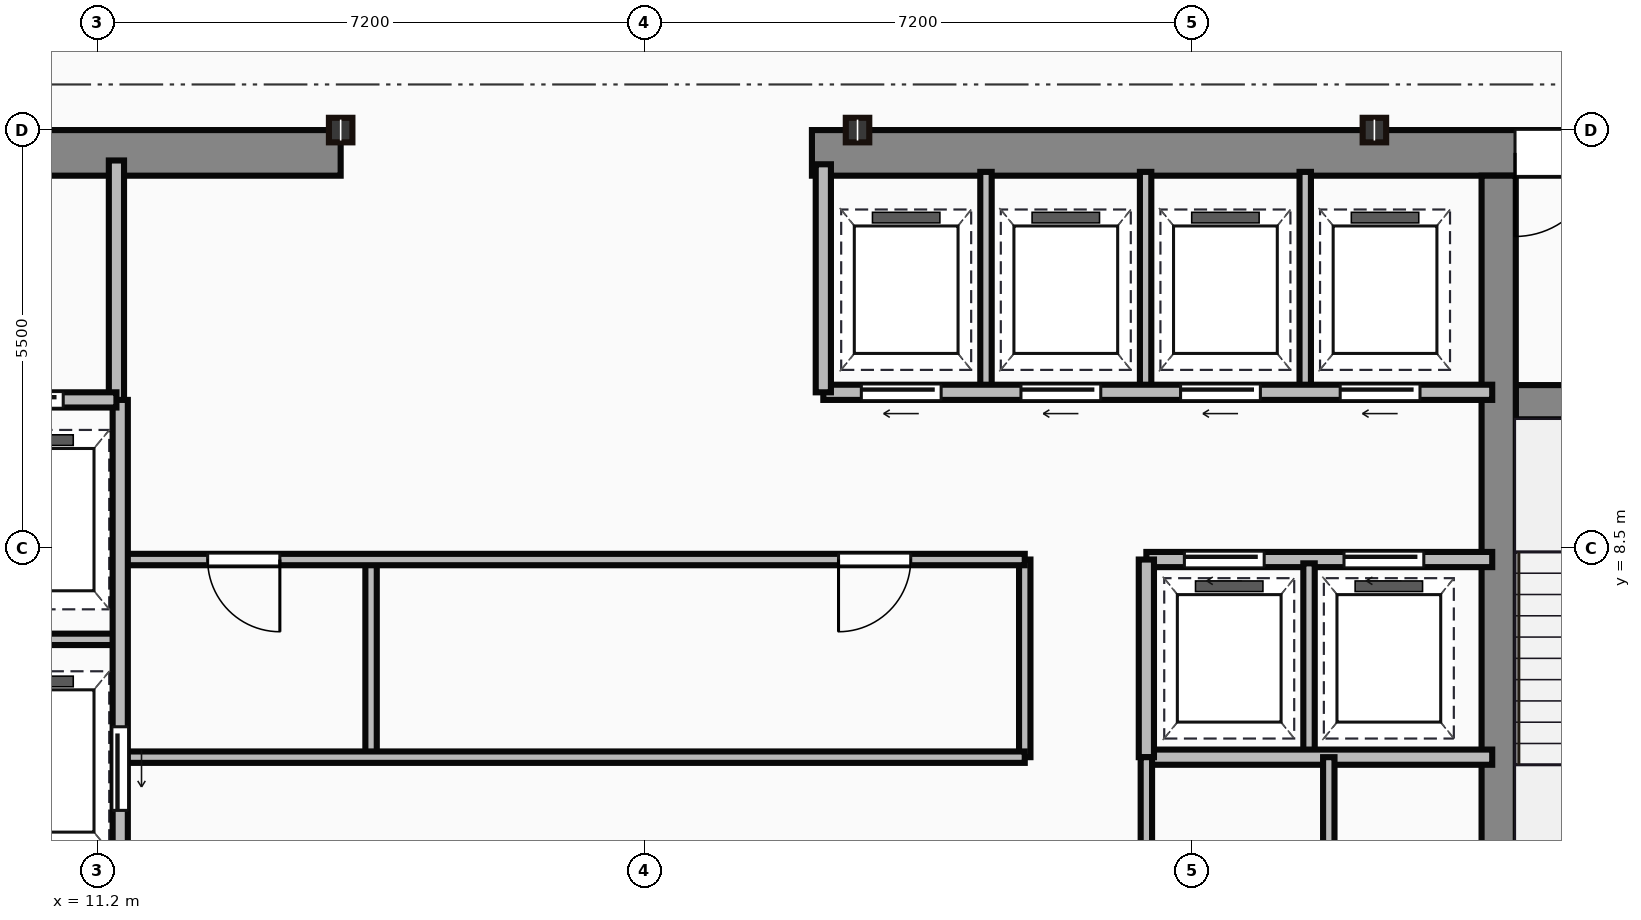
"""IFC4 building model, lengths in metres.
Left out: names, types, materials, properties, quantities, classifications, styles, units other than length and angle.
Written with IfcOpenShell. Run it as: python <this file> out.ifc"""

import sys

from ifc_helpers import new_model, si_unit, direction, frame, frame_2d, origin, origin_2d, place, context, subcontext, project, spatial, rectangle, i_section, extrude, source, transform, mapped, element, fill, save


model = new_model("IFC4")
c1 = context("Model", 3, precision=1e-05, world=origin(), true_north=direction((0.0, 1.0)))
c2 = subcontext(c1, "Body", "Model", "MODEL_VIEW")
j1 = project(units=[si_unit("LENGTHUNIT", "METRE"), si_unit("PLANEANGLEUNIT", "RADIAN")], contexts=[c1])
p1 = place(None, origin())
s1 = spatial("IfcSite", under=j1, at=p1, CompositionType="ELEMENT")
p2 = place(p1, origin())
s2 = spatial("IfcBuilding", under=s1, at=p2, CompositionType="ELEMENT")
p3 = place(p2, frame((0.0, 0.0, 269.75)))
s3 = spatial("IfcBuildingStorey", under=s2, at=p3, CompositionType="ELEMENT", Elevation=269.75)
m1 = source(origin(), c2, "Body", "SweptSolid", [
    extrude(rectangle(XDim=9.1, YDim=0.6, at=frame_2d((4.55, 0.0))), origin(), (0.0, 0.0, 1.0), 3.65),
])
p4 = place(p3, frame((5.3, 13.7, 0.0), z_axis=(0.0, 0.0, 1.0), x_axis=(1.0, 0.0, 0.0)))
e1 = element("IfcWall", 1, at=p4, inside=s3, PredefinedType="SHEAR", context=c2, shape_type="MappedRepresentation", body=[
    mapped(m1, transform((0.0, 0.0, 0.0))),
])
p5 = place(p4, frame((4.1, 0.0, 0.0)))
e2 = element("IfcOpeningElement", 2, at=p5, cuts=e1, PredefinedType="OPENING", context=c2, shape_type="SweptSolid", body=[
    extrude(rectangle(XDim=1.1, YDim=2.15, at=frame_2d((0.55, 1.075))), frame((0.0, 0.31, 0.0), z_axis=(0.0, -1.0, 0.0), x_axis=(1.0, 0.0, 0.0)), (0.0, 0.0, 1.0), 0.62),
])
m2 = source(origin(), c2, "Body", "SweptSolid", [
    extrude(rectangle(XDim=12.6, YDim=0.6, at=frame_2d((6.3, 0.0))), origin(), (0.0, 0.0, 1.0), 3.65),
])
p6 = place(p3, frame((20.6, 13.7, 0.0), z_axis=(0.0, 0.0, 1.0), x_axis=(1.0, 0.0, 0.0)))
e3 = element("IfcWall", 3, at=p6, inside=s3, PredefinedType="SHEAR", context=c2, shape_type="MappedRepresentation", body=[
    mapped(m2, transform((0.0, 0.0, 0.0))),
])
p7 = place(p6, frame((9.25, 0.0, 0.0)))
e4 = element("IfcOpeningElement", 4, at=p7, cuts=e3, PredefinedType="OPENING", context=c2, shape_type="SweptSolid", body=[
    extrude(rectangle(XDim=1.1, YDim=2.15, at=frame_2d((0.55, 1.075))), frame((0.0, 0.31, 0.0), z_axis=(0.0, -1.0, 0.0), x_axis=(1.0, 0.0, 0.0)), (0.0, 0.0, 1.0), 0.62),
])
m3 = source(origin(), c2, "Body", "SweptSolid", [
    extrude(rectangle(XDim=12.5, YDim=0.45, at=frame_2d((6.25, 0.0))), origin(), (0.0, 0.0, 1.0), 3.65),
])
p8 = place(p3, frame((29.635, 0.9, 0.0), z_axis=(0.0, 0.0, 1.0), x_axis=(0.0, 1.0, 0.0)))
e5 = element("IfcWall", 5, at=p8, inside=s3, PredefinedType="SHEAR", context=c2, shape_type="MappedRepresentation", body=[
    mapped(m3, transform((0.0, 0.0, 0.0))),
])
m4 = source(origin(), c2, "Body", "SweptSolid", [
    extrude(rectangle(XDim=3.39, YDim=0.45, at=frame_2d((1.695, 0.0))), origin(), (0.0, 0.0, 1.0), 3.65),
])
p9 = place(p3, frame((29.86, 10.42, 0.0), z_axis=(0.0, 0.0, 1.0), x_axis=(1.0, 0.0, 0.0)))
e6 = element("IfcWall", 6, at=p9, inside=s3, PredefinedType="SHEAR", context=c2, shape_type="MappedRepresentation", body=[
    mapped(m4, transform((0.0, 0.0, 0.0))),
])
p10 = place(p9, frame((1.1, 0.0, 0.0)))
e7 = element("IfcOpeningElement", 7, at=p10, cuts=e6, PredefinedType="OPENING", context=c2, shape_type="SweptSolid", body=[
    extrude(rectangle(XDim=1.1, YDim=2.15, at=frame_2d((0.55, 1.075))), frame((0.0, 0.235, 0.0), z_axis=(0.0, -1.0, 0.0), x_axis=(1.0, 0.0, 0.0)), (0.0, 0.0, 1.0), 0.47),
])
m5 = source(origin(), c2, "Body", "SweptSolid", [
    extrude(i_section(OverallWidth=0.309, OverallDepth=0.323, WebThickness=0.014, FlangeThickness=0.023, at=origin_2d()), origin(), (0.0, 0.0, 1.0), 3.65),
])
for number, where, z_axis, x_axis in (
    (8, (14.4, 14.0, 0.0), (0.0, 0.0, 1.0), (1.0, 0.0, 0.0)),
    (9, (21.2, 14.0, 0.0), (0.0, 0.0, 1.0), (1.0, 0.0, 0.0)),
    (10, (28.0, 14.0, 0.0), (0.0, 0.0, 1.0), (1.0, 0.0, 0.0)),
):
    element("IfcColumn", number, at=place(p3, frame(where, z_axis=z_axis, x_axis=x_axis)), inside=s3, PredefinedType="COLUMN", context=c2, shape_type="MappedRepresentation", body=[
        mapped(m5, transform((0.0, 0.0, 0.0))),
    ])
m6 = source(origin(), c2, "Body", "SweptSolid", [
    extrude(rectangle(XDim=3.18, YDim=0.2, at=frame_2d((1.59, 0.0))), origin(), (0.0, 0.0, 1.0), 3.4),
])
p11 = place(p3, frame((11.45, 10.42, 0.0), z_axis=(0.0, 0.0, 1.0), x_axis=(0.0, 1.0, 0.0)))
e11 = element("IfcWall", 11, at=p11, inside=s3, PredefinedType="PARTITIONING", context=c2, shape_type="MappedRepresentation", body=[
    mapped(m6, transform((0.0, 0.0, 0.0))),
])
m7 = source(origin(), c2, "Body", "SweptSolid", [
    extrude(rectangle(XDim=2.35, YDim=0.2, at=frame_2d((1.175, 0.0))), origin(), (0.0, 0.0, 1.0), 3.4),
])
p12 = place(p3, frame((9.1, 10.45, 0.0), z_axis=(0.0, 0.0, 1.0), x_axis=(1.0, 0.0, 0.0)))
e12 = element("IfcWall", 12, at=p12, inside=s3, PredefinedType="PARTITIONING", context=c2, shape_type="MappedRepresentation", body=[
    mapped(m7, transform((0.0, 0.0, 0.0))),
])
p13 = place(p12, frame((0.55, 0.0, 0.0)))
e13 = element("IfcOpeningElement", 13, at=p13, cuts=e12, PredefinedType="OPENING", context=c2, shape_type="SweptSolid", body=[
    extrude(rectangle(XDim=1.1, YDim=2.15, at=frame_2d((0.55, 1.075))), frame((0.0, 0.11, 0.0), z_axis=(0.0, -1.0, 0.0), x_axis=(1.0, 0.0, 0.0)), (0.0, 0.0, 1.0), 0.22),
])
m8 = source(origin(), c2, "Body", "SweptSolid", [
    extrude(rectangle(XDim=9.6, YDim=0.2, at=frame_2d((4.8, 0.0))), origin(), (0.0, 0.0, 1.0), 3.4),
])
p14 = place(p3, frame((11.5, 0.85, 0.0), z_axis=(0.0, 0.0, 1.0), x_axis=(0.0, 1.0, 0.0)))
e14 = element("IfcWall", 14, at=p14, inside=s3, PredefinedType="PARTITIONING", context=c2, shape_type="MappedRepresentation", body=[
    mapped(m8, transform((0.0, 0.0, 0.0))),
])
p15 = place(p14, frame((4.2, 0.0, 0.0)))
e15 = element("IfcOpeningElement", 15, at=p15, cuts=e14, PredefinedType="OPENING", context=c2, shape_type="SweptSolid", body=[
    extrude(rectangle(XDim=1.1, YDim=2.15, at=frame_2d((0.55, 1.075))), frame((0.0, 0.11, 0.0), z_axis=(0.0, -1.0, 0.0), x_axis=(1.0, 0.0, 0.0)), (0.0, 0.0, 1.0), 0.22),
])
p16 = place(p14, frame((0.9, 0.0, 0.0)))
e16 = element("IfcOpeningElement", 16, at=p16, cuts=e14, PredefinedType="OPENING", context=c2, shape_type="SweptSolid", body=[
    extrude(rectangle(XDim=1.2, YDim=2.15, at=frame_2d((0.6, 1.075))), frame((0.0, 0.11, 0.0), z_axis=(0.0, -1.0, 0.0), x_axis=(1.0, 0.0, 0.0)), (0.0, 0.0, 1.0), 0.22),
])
m9 = source(origin(), c2, "Body", "SweptSolid", [
    extrude(rectangle(XDim=2.4, YDim=0.15, at=frame_2d((1.2, 0.0))), origin(), (0.0, 0.0, 1.0), 3.4),
])
p17 = place(p3, frame((9.1, 7.3, 0.0), z_axis=(0.0, 0.0, 1.0), x_axis=(1.0, 0.0, 0.0)))
e17 = element("IfcWall", 17, at=p17, inside=s3, PredefinedType="PARTITIONING", context=c2, shape_type="MappedRepresentation", body=[
    mapped(m9, transform((0.0, 0.0, 0.0))),
])
m10 = source(origin(), c2, "Body", "SweptSolid", [
    extrude(rectangle(XDim=11.85, YDim=0.15, at=frame_2d((5.925, 0.0))), origin(), (0.0, 0.0, 1.0), 3.4),
])
p18 = place(p3, frame((11.55, 5.75, 0.0), z_axis=(0.0, 0.0, 1.0), x_axis=(1.0, 0.0, 0.0)))
e18 = element("IfcWall", 18, at=p18, inside=s3, PredefinedType="PARTITIONING", context=c2, shape_type="MappedRepresentation", body=[
    mapped(m10, transform((0.0, 0.0, 0.0))),
])
p19 = place(p3, frame((11.55, 8.35, 0.0), z_axis=(0.0, 0.0, 1.0), x_axis=(1.0, 0.0, 0.0)))
e19 = element("IfcWall", 19, at=p19, inside=s3, PredefinedType="PARTITIONING", context=c2, shape_type="MappedRepresentation", body=[
    mapped(m10, transform((0.0, 0.0, 0.0))),
])
p20 = place(p19, frame((1.1, 0.0, 0.0)))
e20 = element("IfcOpeningElement", 20, at=p20, cuts=e19, PredefinedType="OPENING", context=c2, shape_type="SweptSolid", body=[
    extrude(rectangle(XDim=0.95, YDim=2.15, at=frame_2d((0.475, 1.075))), frame((0.0, 0.085, 0.0), z_axis=(0.0, -1.0, 0.0), x_axis=(1.0, 0.0, 0.0)), (0.0, 0.0, 1.0), 0.17),
])
p21 = place(p19, frame((9.4, 0.0, 0.0)))
e21 = element("IfcOpeningElement", 21, at=p21, cuts=e19, PredefinedType="OPENING", context=c2, shape_type="SweptSolid", body=[
    extrude(rectangle(XDim=0.95, YDim=2.15, at=frame_2d((0.475, 1.075))), frame((0.0, 0.085, 0.0), z_axis=(0.0, -1.0, 0.0), x_axis=(1.0, 0.0, 0.0)), (0.0, 0.0, 1.0), 0.17),
])
m11 = source(origin(), c2, "Body", "SweptSolid", [
    extrude(rectangle(XDim=2.6, YDim=0.15, at=frame_2d((1.3, 0.0))), origin(), (0.0, 0.0, 1.0), 3.4),
])
p22 = place(p3, frame((23.4, 5.75, 0.0), z_axis=(0.0, 0.0, 1.0), x_axis=(0.0, 1.0, 0.0)))
e22 = element("IfcWall", 22, at=p22, inside=s3, PredefinedType="PARTITIONING", context=c2, shape_type="MappedRepresentation", body=[
    mapped(m11, transform((0.0, 0.0, 0.0))),
])
m12 = source(origin(), c2, "Body", "SweptSolid", [
    extrude(rectangle(XDim=2.5, YDim=0.15, at=frame_2d((1.25, 0.0))), origin(), (0.0, 0.0, 1.0), 3.4),
])
p23 = place(p3, frame((14.8, 5.8, 0.0), z_axis=(0.0, 0.0, 1.0), x_axis=(0.0, 1.0, 0.0)))
e23 = element("IfcWall", 23, at=p23, inside=s3, PredefinedType="PARTITIONING", context=c2, shape_type="MappedRepresentation", body=[
    mapped(m12, transform((0.0, 0.0, 0.0))),
])
m13 = source(origin(), c2, "Body", "SweptSolid", [
    extrude(rectangle(XDim=8.8, YDim=0.2, at=frame_2d((4.4, 0.0))), origin(), (0.0, 0.0, 1.0), 3.4),
])
p24 = place(p3, frame((20.75, 10.55, 0.0), z_axis=(0.0, 0.0, 1.0), x_axis=(1.0, 0.0, 0.0)))
e24 = element("IfcWall", 24, at=p24, inside=s3, PredefinedType="PARTITIONING", context=c2, shape_type="MappedRepresentation", body=[
    mapped(m13, transform((0.0, 0.0, 0.0))),
])
p25 = place(p24, frame((0.5, 0.0, 0.0)))
e25 = element("IfcOpeningElement", 25, at=p25, cuts=e24, PredefinedType="OPENING", context=c2, shape_type="SweptSolid", body=[
    extrude(rectangle(XDim=1.05, YDim=2.15, at=frame_2d((0.525, 1.075))), frame((0.0, 0.11, 0.0), z_axis=(0.0, -1.0, 0.0), x_axis=(1.0, 0.0, 0.0)), (0.0, 0.0, 1.0), 0.22),
])
p26 = place(p24, frame((2.6, 0.0, 0.0)))
e26 = element("IfcOpeningElement", 26, at=p26, cuts=e24, PredefinedType="OPENING", context=c2, shape_type="SweptSolid", body=[
    extrude(rectangle(XDim=1.05, YDim=2.15, at=frame_2d((0.525, 1.075))), frame((0.0, 0.11, 0.0), z_axis=(0.0, -1.0, 0.0), x_axis=(1.0, 0.0, 0.0)), (0.0, 0.0, 1.0), 0.22),
])
p27 = place(p24, frame((4.7, 0.0, 0.0)))
e27 = element("IfcOpeningElement", 27, at=p27, cuts=e24, PredefinedType="OPENING", context=c2, shape_type="SweptSolid", body=[
    extrude(rectangle(XDim=1.05, YDim=2.15, at=frame_2d((0.525, 1.075))), frame((0.0, 0.11, 0.0), z_axis=(0.0, -1.0, 0.0), x_axis=(1.0, 0.0, 0.0)), (0.0, 0.0, 1.0), 0.22),
])
p28 = place(p24, frame((6.8, 0.0, 0.0)))
e28 = element("IfcOpeningElement", 28, at=p28, cuts=e24, PredefinedType="OPENING", context=c2, shape_type="SweptSolid", body=[
    extrude(rectangle(XDim=1.05, YDim=2.15, at=frame_2d((0.525, 1.075))), frame((0.0, 0.11, 0.0), z_axis=(0.0, -1.0, 0.0), x_axis=(1.0, 0.0, 0.0)), (0.0, 0.0, 1.0), 0.22),
])
m14 = source(origin(), c2, "Body", "SweptSolid", [
    extrude(rectangle(XDim=3.0, YDim=0.2, at=frame_2d((1.5, 0.0))), origin(), (0.0, 0.0, 1.0), 3.4),
])
p29 = place(p3, frame((20.75, 10.55, 0.0), z_axis=(0.0, 0.0, 1.0), x_axis=(0.0, 1.0, 0.0)))
e29 = element("IfcWall", 29, at=p29, inside=s3, PredefinedType="PARTITIONING", context=c2, shape_type="MappedRepresentation", body=[
    mapped(m14, transform((0.0, 0.0, 0.0))),
])
m15 = source(origin(), c2, "Body", "SweptSolid", [
    extrude(rectangle(XDim=2.85, YDim=0.15, at=frame_2d((1.425, 0.0))), origin(), (0.0, 0.0, 1.0), 3.4),
])
for number, where, z_axis, x_axis in (
    (30, (22.89, 10.6, 0.0), (0.0, 0.0, 1.0), (0.0, 1.0, 0.0)),
    (31, (24.99, 10.6, 0.0), (0.0, 0.0, 1.0), (0.0, 1.0, 0.0)),
    (32, (27.09, 10.6, 0.0), (0.0, 0.0, 1.0), (0.0, 1.0, 0.0)),
):
    element("IfcWall", number, at=place(p3, frame(where, z_axis=z_axis, x_axis=x_axis)), inside=s3, PredefinedType="PARTITIONING", context=c2, shape_type="MappedRepresentation", body=[
        mapped(m15, transform((0.0, 0.0, 0.0))),
    ])
m16 = source(origin(), c2, "Body", "SweptSolid", [
    extrude(rectangle(XDim=4.55, YDim=0.2, at=frame_2d((2.275, 0.0))), origin(), (0.0, 0.0, 1.0), 3.4),
])
p30 = place(p3, frame((25.0, 8.35, 0.0), z_axis=(0.0, 0.0, 1.0), x_axis=(1.0, 0.0, 0.0)))
e33 = element("IfcWall", 33, at=p30, inside=s3, PredefinedType="PARTITIONING", context=c2, shape_type="MappedRepresentation", body=[
    mapped(m16, transform((0.0, 0.0, 0.0))),
])
p31 = place(p30, frame((0.5, 0.0, 0.0)))
e34 = element("IfcOpeningElement", 34, at=p31, cuts=e33, PredefinedType="OPENING", context=c2, shape_type="SweptSolid", body=[
    extrude(rectangle(XDim=1.05, YDim=2.15, at=frame_2d((0.525, 1.075))), frame((0.0, 0.11, 0.0), z_axis=(0.0, -1.0, 0.0), x_axis=(1.0, 0.0, 0.0)), (0.0, 0.0, 1.0), 0.22),
])
p32 = place(p30, frame((2.6, 0.0, 0.0)))
e35 = element("IfcOpeningElement", 35, at=p32, cuts=e33, PredefinedType="OPENING", context=c2, shape_type="SweptSolid", body=[
    extrude(rectangle(XDim=1.05, YDim=2.15, at=frame_2d((0.525, 1.075))), frame((0.0, 0.11, 0.0), z_axis=(0.0, -1.0, 0.0), x_axis=(1.0, 0.0, 0.0)), (0.0, 0.0, 1.0), 0.22),
])
p33 = place(p3, frame((25.0, 5.75, 0.0), z_axis=(0.0, 0.0, 1.0), x_axis=(1.0, 0.0, 0.0)))
e36 = element("IfcWall", 36, at=p33, inside=s3, PredefinedType="PARTITIONING", context=c2, shape_type="MappedRepresentation", body=[
    mapped(m16, transform((0.0, 0.0, 0.0))),
])
m17 = source(origin(), c2, "Body", "SweptSolid", [
    extrude(rectangle(XDim=2.6, YDim=0.2, at=frame_2d((1.3, 0.0))), origin(), (0.0, 0.0, 1.0), 3.4),
])
p34 = place(p3, frame((25.0, 5.75, 0.0), z_axis=(0.0, 0.0, 1.0), x_axis=(0.0, 1.0, 0.0)))
e37 = element("IfcWall", 37, at=p34, inside=s3, PredefinedType="PARTITIONING", context=c2, shape_type="MappedRepresentation", body=[
    mapped(m17, transform((0.0, 0.0, 0.0))),
])
p35 = place(p3, frame((27.14, 5.8, 0.0), z_axis=(0.0, 0.0, 1.0), x_axis=(0.0, 1.0, 0.0)))
e38 = element("IfcWall", 38, at=p35, inside=s3, PredefinedType="PARTITIONING", context=c2, shape_type="MappedRepresentation", body=[
    mapped(m12, transform((0.0, 0.0, 0.0))),
])
m18 = source(origin(), c2, "Body", "SweptSolid", [
    extrude(rectangle(XDim=4.9, YDim=0.15, at=frame_2d((2.45, 0.0))), origin(), (0.0, 0.0, 1.0), 3.4),
])
p36 = place(p3, frame((25.0, 0.85, 0.0), z_axis=(0.0, 0.0, 1.0), x_axis=(0.0, 1.0, 0.0)))
e39 = element("IfcWall", 39, at=p36, inside=s3, PredefinedType="PARTITIONING", context=c2, shape_type="MappedRepresentation", body=[
    mapped(m18, transform((0.0, 0.0, 0.0))),
])
p37 = place(p36, frame((2.5, 0.0, 0.0)))
e40 = element("IfcOpeningElement", 40, at=p37, cuts=e39, PredefinedType="OPENING", context=c2, shape_type="SweptSolid", body=[
    extrude(rectangle(XDim=0.95, YDim=2.15, at=frame_2d((0.475, 1.075))), frame((0.0, 0.085, 0.0), z_axis=(0.0, -1.0, 0.0), x_axis=(1.0, 0.0, 0.0)), (0.0, 0.0, 1.0), 0.17),
])
m19 = source(origin(), c2, "Body", "SweptSolid", [
    extrude(rectangle(XDim=3.4, YDim=0.15, at=frame_2d((1.7, 0.0))), origin(), (0.0, 0.0, 1.0), 3.4),
])
p38 = place(p3, frame((27.4, 2.35, 0.0), z_axis=(0.0, 0.0, 1.0), x_axis=(0.0, 1.0, 0.0)))
e41 = element("IfcWall", 41, at=p38, inside=s3, PredefinedType="PARTITIONING", context=c2, shape_type="MappedRepresentation", body=[
    mapped(m19, transform((0.0, 0.0, 0.0))),
])
p39 = place(p38, frame((1.1, 0.0, 0.0)))
e42 = element("IfcOpeningElement", 42, at=p39, cuts=e41, PredefinedType="OPENING", context=c2, shape_type="SweptSolid", body=[
    extrude(rectangle(XDim=0.85, YDim=2.1, at=frame_2d((0.425, 1.05))), frame((0.0, 0.085, 0.0), z_axis=(0.0, -1.0, 0.0), x_axis=(1.0, 0.0, 0.0)), (0.0, 0.0, 1.0), 0.17),
])
m20 = source(origin(), c2, "Body", "SweptSolid", [
    extrude(rectangle(XDim=1.1, YDim=2.15, at=frame_2d((0.55, 1.075))), frame((0.0, 0.025, 0.0), z_axis=(0.0, -1.0, 0.0), x_axis=(1.0, 0.0, 0.0)), (0.0, 0.0, 1.0), 0.05),
])
p40 = place(p7, origin())
e43 = element("IfcDoor", 43, at=p40, inside=s3, OperationType="SINGLE_SWING_LEFT", PredefinedType="DOOR", context=c2, shape_type="MappedRepresentation", body=[
    mapped(m20, transform((0.0, 0.0, 0.0))),
])
fill(e4, e43)
p41 = place(p13, origin())
e44 = element("IfcDoor", 44, at=p41, inside=s3, OperationType="SLIDING_TO_LEFT", PredefinedType="DOOR", context=c2, shape_type="MappedRepresentation", body=[
    mapped(m20, transform((0.0, 0.0, 0.0))),
])
fill(e13, e44)
p42 = place(p15, frame((1.1, 0.0, 0.0), z_axis=(0.0, 0.0, 1.0), x_axis=(-1.0, 0.0, 0.0)))
e45 = element("IfcDoor", 45, at=p42, inside=s3, OperationType="SLIDING_TO_LEFT", PredefinedType="DOOR", context=c2, shape_type="MappedRepresentation", body=[
    mapped(m20, transform((0.0, 0.0, 0.0))),
])
fill(e15, e45)
m21 = source(origin(), c2, "Body", "SweptSolid", [
    extrude(rectangle(XDim=0.95, YDim=2.15, at=frame_2d((0.475, 1.075))), frame((0.0, 0.025, 0.0), z_axis=(0.0, -1.0, 0.0), x_axis=(1.0, 0.0, 0.0)), (0.0, 0.0, 1.0), 0.05),
])
p43 = place(p20, origin())
e46 = element("IfcDoor", 46, at=p43, inside=s3, OperationType="SINGLE_SWING_RIGHT", PredefinedType="DOOR", context=c2, shape_type="MappedRepresentation", body=[
    mapped(m21, transform((0.0, 0.0, 0.0))),
])
fill(e20, e46)
p44 = place(p21, origin())
e47 = element("IfcDoor", 47, at=p44, inside=s3, OperationType="SINGLE_SWING_LEFT", PredefinedType="DOOR", context=c2, shape_type="MappedRepresentation", body=[
    mapped(m21, transform((0.0, 0.0, 0.0))),
])
fill(e21, e47)
m22 = source(origin(), c2, "Body", "SweptSolid", [
    extrude(rectangle(XDim=1.05, YDim=2.15, at=frame_2d((0.525, 1.075))), frame((0.0, 0.025, 0.0), z_axis=(0.0, -1.0, 0.0), x_axis=(1.0, 0.0, 0.0)), (0.0, 0.0, 1.0), 0.05),
])
p45 = place(p25, frame((1.05, 0.0, 0.0), z_axis=(0.0, 0.0, 1.0), x_axis=(-1.0, 0.0, 0.0)))
e48 = element("IfcDoor", 48, at=p45, inside=s3, OperationType="SLIDING_TO_LEFT", PredefinedType="DOOR", context=c2, shape_type="MappedRepresentation", body=[
    mapped(m22, transform((0.0, 0.0, 0.0))),
])
fill(e25, e48)
p46 = place(p26, frame((1.05, 0.0, 0.0), z_axis=(0.0, 0.0, 1.0), x_axis=(-1.0, 0.0, 0.0)))
e49 = element("IfcDoor", 49, at=p46, inside=s3, OperationType="SLIDING_TO_LEFT", PredefinedType="DOOR", context=c2, shape_type="MappedRepresentation", body=[
    mapped(m22, transform((0.0, 0.0, 0.0))),
])
fill(e26, e49)
p47 = place(p27, frame((1.05, 0.0, 0.0), z_axis=(0.0, 0.0, 1.0), x_axis=(-1.0, 0.0, 0.0)))
e50 = element("IfcDoor", 50, at=p47, inside=s3, OperationType="SLIDING_TO_LEFT", PredefinedType="DOOR", context=c2, shape_type="MappedRepresentation", body=[
    mapped(m22, transform((0.0, 0.0, 0.0))),
])
fill(e27, e50)
p48 = place(p28, frame((1.05, 0.0, 0.0), z_axis=(0.0, 0.0, 1.0), x_axis=(-1.0, 0.0, 0.0)))
e51 = element("IfcDoor", 51, at=p48, inside=s3, OperationType="SLIDING_TO_LEFT", PredefinedType="DOOR", context=c2, shape_type="MappedRepresentation", body=[
    mapped(m22, transform((0.0, 0.0, 0.0))),
])
fill(e28, e51)
p49 = place(p31, origin())
e52 = element("IfcDoor", 52, at=p49, inside=s3, OperationType="SLIDING_TO_LEFT", PredefinedType="DOOR", context=c2, shape_type="MappedRepresentation", body=[
    mapped(m22, transform((0.0, 0.0, 0.0))),
])
fill(e34, e52)
p50 = place(p32, origin())
e53 = element("IfcDoor", 53, at=p50, inside=s3, OperationType="SLIDING_TO_LEFT", PredefinedType="DOOR", context=c2, shape_type="MappedRepresentation", body=[
    mapped(m22, transform((0.0, 0.0, 0.0))),
])
fill(e35, e53)
save(model, sys.argv[1])
